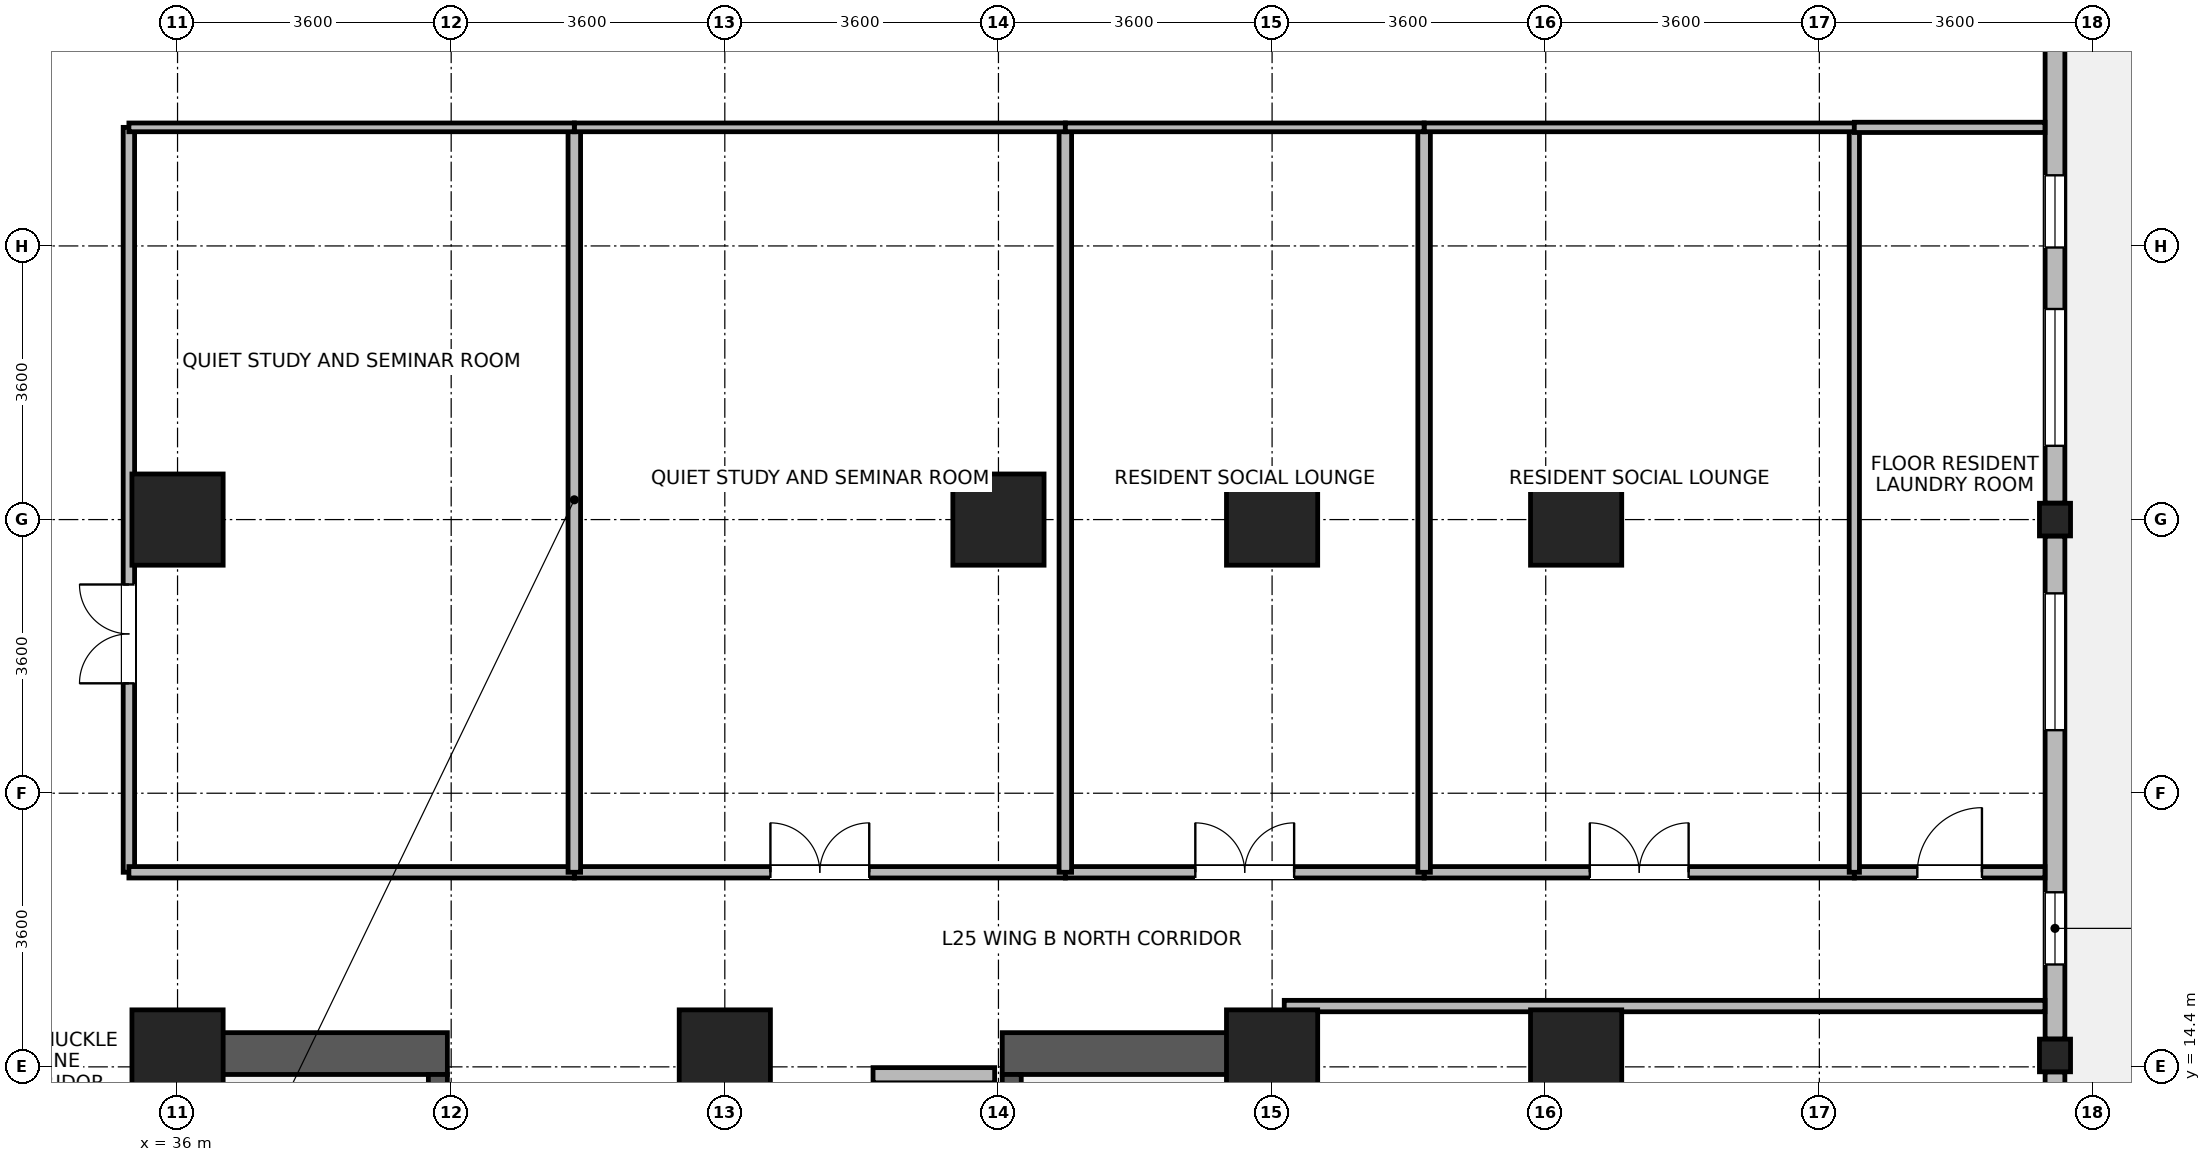
"""IFC4 building model, lengths in metres.
Left out: names, types, materials, properties, quantities, classifications, styles, units other than length and angle.
Written with IfcOpenShell. Run it as: python <this file> out.ifc"""

import sys

from ifc_helpers import new_model, si_unit, direction, frame, frame_2d, origin, origin_2d, place, context, subcontext, project, spatial, rectangle, i_section, extrude, source, transform, mapped, element, fill, save


model = new_model("IFC4")
c1 = context("Model", 3, precision=1e-05, world=origin(), true_north=direction((0.0, 1.0)))
c2 = subcontext(c1, "Body", "Model", "MODEL_VIEW")
j1 = project(units=[si_unit("LENGTHUNIT", "METRE"), si_unit("PLANEANGLEUNIT", "RADIAN")], contexts=[c1])
p1 = place(None, origin())
s1 = spatial("IfcSite", under=j1, at=p1, CompositionType="ELEMENT")
p2 = place(p1, origin())
s2 = spatial("IfcBuilding", under=s1, at=p2, CompositionType="ELEMENT")
p3 = place(p2, frame((0.0, 0.0, 100.8)))
s3 = spatial("IfcBuildingStorey", under=s2, at=p3, CompositionType="ELEMENT", Elevation=100.8)
for number, where, z_axis, x_axis in (
    (1, (36.075, 6.75, 0.0), (0.0, 0.0, 1.0), (0.0, 1.0, 0.0)),
    (2, (50.325, 6.75, 0.0), (0.0, 0.0, 1.0), (0.0, 1.0, 0.0)),
):
    element("IfcWall", number, at=place(p3, frame(where, z_axis=z_axis, x_axis=x_axis)), inside=s3, PredefinedType="SHEAR", context=c2, shape_type="SweptSolid", body=[
        extrude(rectangle(XDim=8.1, YDim=0.55, at=frame_2d((4.05, 0.0))), origin(), (0.0, 0.0, 1.0), 3.45),
    ])
for number, where, z_axis, x_axis in (
    (3, (36.35, 14.575, 0.0), (0.0, 0.0, 1.0), (1.0, 0.0, 0.0)),
    (4, (46.85, 14.575, 0.0), (0.0, 0.0, 1.0), (1.0, 0.0, 0.0)),
):
    element("IfcWall", number, at=place(p3, frame(where, z_axis=z_axis, x_axis=x_axis)), inside=s3, PredefinedType="SHEAR", context=c2, shape_type="SweptSolid", body=[
        extrude(rectangle(XDim=3.2, YDim=0.55, at=frame_2d((1.6, 0.0))), origin(), (0.0, 0.0, 1.0), 3.45),
    ])
p4 = place(p3, frame((39.425, 7.3, 0.0), z_axis=(0.0, 0.0, 1.0), x_axis=(0.0, 1.0, 0.0)))
e5 = element("IfcWall", 5, at=p4, inside=s3, PredefinedType="SHEAR", context=c2, shape_type="SweptSolid", body=[
    extrude(rectangle(XDim=7.0, YDim=0.25, at=frame_2d((3.5, 0.0))), origin(), (0.0, 0.0, 1.0), 3.45),
])
p5 = place(p4, frame((0.15, 0.0, 0.0)))
e6 = element("IfcOpeningElement", 6, at=p5, cuts=e5, PredefinedType="OPENING", context=c2, shape_type="SweptSolid", body=[
    extrude(rectangle(XDim=1.1, YDim=2.08, at=frame_2d((0.55, 1.04))), frame((0.0, 0.135, 0.0), z_axis=(0.0, -1.0, 0.0), x_axis=(1.0, 0.0, 0.0)), (0.0, 0.0, 1.0), 0.27),
])
p6 = place(p3, frame((46.975, 7.3, 0.0), z_axis=(0.0, 0.0, 1.0), x_axis=(0.0, 1.0, 0.0)))
e7 = element("IfcWall", 7, at=p6, inside=s3, PredefinedType="SHEAR", context=c2, shape_type="SweptSolid", body=[
    extrude(rectangle(XDim=7.0, YDim=0.25, at=frame_2d((3.5, 0.0))), origin(), (0.0, 0.0, 1.0), 3.45),
])
p7 = place(p6, frame((0.15, 0.0, 0.0)))
e8 = element("IfcOpeningElement", 8, at=p7, cuts=e7, PredefinedType="OPENING", context=c2, shape_type="SweptSolid", body=[
    extrude(rectangle(XDim=1.1, YDim=2.08, at=frame_2d((0.55, 1.04))), frame((0.0, 0.135, 0.0), z_axis=(0.0, -1.0, 0.0), x_axis=(1.0, 0.0, 0.0)), (0.0, 0.0, 1.0), 0.27),
])
m1 = source(origin(), c2, "Body", "SweptSolid", [
    extrude(rectangle(XDim=1.2, YDim=1.2, at=origin_2d()), origin(), (0.0, 0.0, 1.0), 3.7),
])
for number, where, z_axis, x_axis in (
    (9, (36.0, 21.6, 0.0), (0.0, 0.0, 1.0), (1.0, 0.0, 0.0)),
    (10, (46.8, 21.6, 0.0), (0.0, 0.0, 1.0), (1.0, 0.0, 0.0)),
    (11, (36.0, 14.55, 0.0), (0.0, 0.0, 1.0), (1.0, 0.0, 0.0)),
    (12, (43.2, 14.55, 0.0), (0.0, 0.0, 1.0), (1.0, 0.0, 0.0)),
    (13, (50.4, 14.55, 0.0), (0.0, 0.0, 1.0), (1.0, 0.0, 0.0)),
    (14, (50.4, 21.6, 0.0), (0.0, 0.0, 1.0), (1.0, 0.0, 0.0)),
    (15, (54.4, 14.55, 0.0), (0.0, 0.0, 1.0), (1.0, 0.0, 0.0)),
    (16, (54.4, 21.6, 0.0), (0.0, 0.0, 1.0), (1.0, 0.0, 0.0)),
):
    element("IfcColumn", number, at=place(p3, frame(where, z_axis=z_axis, x_axis=x_axis)), inside=s3, PredefinedType="COLUMN", context=c2, shape_type="MappedRepresentation", body=[
        mapped(m1, transform((0.0, 0.0, 0.0), x_axis=(1.0, 0.0, 0.0), y_axis=(0.0, 1.0, 0.0), z_axis=(0.0, 0.0, 1.0), scale=1.0)),
    ])
m2 = source(origin(), c2, "Body", "SweptSolid", [
    extrude(i_section(OverallWidth=0.409, OverallDepth=0.43, WebThickness=0.024, FlangeThickness=0.033, FilletRadius=0.015, at=origin_2d()), origin(), (0.0, 0.0, 1.0), 3.7),
])
for number, where, z_axis, x_axis in (
    (17, (60.7, 14.55, 0.0), (0.0, 0.0, 1.0), (1.0, 0.0, 0.0)),
    (18, (60.7, 21.6, 0.0), (0.0, 0.0, 1.0), (1.0, 0.0, 0.0)),
):
    element("IfcColumn", number, at=place(p3, frame(where, z_axis=z_axis, x_axis=x_axis)), inside=s3, PredefinedType="COLUMN", context=c2, shape_type="MappedRepresentation", body=[
        mapped(m2, transform((0.0, 0.0, 0.0), x_axis=(1.0, 0.0, 0.0), y_axis=(0.0, 1.0, 0.0), z_axis=(0.0, 0.0, 1.0), scale=1.0)),
    ])
p8 = place(p3, frame((60.7, 14.334, 0.0), z_axis=(0.0, 0.0, 1.0), x_axis=(0.0, -1.0, 0.0)))
e19 = element("IfcWall", 19, at=p8, inside=s3, PredefinedType="STANDARD", context=c2, shape_type="SweptSolid", body=[
    extrude(rectangle(XDim=7.068, YDim=0.26, at=frame_2d((3.534, 0.0))), origin(), (0.0, 0.0, 1.0), 2.98),
])
p9 = place(p8, frame((0.867, 0.0, 0.85)))
e20 = element("IfcOpeningElement", 20, at=p9, cuts=e19, PredefinedType="OPENING", context=c2, shape_type="SweptSolid", body=[
    extrude(rectangle(XDim=1.8, YDim=1.85, at=frame_2d((0.9, 0.925))), frame((0.0, 0.14, 0.0), z_axis=(0.0, -1.0, 0.0), x_axis=(1.0, 0.0, 0.0)), (0.0, 0.0, 1.0), 0.28),
])
p10 = place(p8, frame((4.401, 0.0, 0.85)))
e21 = element("IfcOpeningElement", 21, at=p10, cuts=e19, PredefinedType="OPENING", context=c2, shape_type="SweptSolid", body=[
    extrude(rectangle(XDim=1.8, YDim=1.85, at=frame_2d((0.9, 0.925))), frame((0.0, 0.14, 0.0), z_axis=(0.0, -1.0, 0.0), x_axis=(1.0, 0.0, 0.0)), (0.0, 0.0, 1.0), 0.28),
])
p11 = place(p3, frame((60.7, 21.384, 0.0), z_axis=(0.0, 0.0, 1.0), x_axis=(0.0, -1.0, 0.0)))
e22 = element("IfcWall", 22, at=p11, inside=s3, PredefinedType="STANDARD", context=c2, shape_type="SweptSolid", body=[
    extrude(rectangle(XDim=6.618, YDim=0.26, at=frame_2d((3.309, 0.0))), origin(), (0.0, 0.0, 1.0), 2.98),
])
p12 = place(p11, frame((0.754, 0.0, 0.85)))
e23 = element("IfcOpeningElement", 23, at=p12, cuts=e22, PredefinedType="OPENING", context=c2, shape_type="SweptSolid", body=[
    extrude(rectangle(XDim=1.8, YDim=1.85, at=frame_2d((0.9, 0.925))), frame((0.0, 0.14, 0.0), z_axis=(0.0, -1.0, 0.0), x_axis=(1.0, 0.0, 0.0)), (0.0, 0.0, 1.0), 0.28),
])
p13 = place(p11, frame((4.687, 0.0, 0.85)))
e24 = element("IfcOpeningElement", 24, at=p13, cuts=e22, PredefinedType="OPENING", context=c2, shape_type="SweptSolid", body=[
    extrude(rectangle(XDim=0.95, YDim=1.75, at=frame_2d((0.475, 0.875))), frame((0.0, 0.14, 0.0), z_axis=(0.0, -1.0, 0.0), x_axis=(1.0, 0.0, 0.0)), (0.0, 0.0, 1.0), 0.28),
])
p14 = place(p3, frame((60.7, 28.434, 0.0), z_axis=(0.0, 0.0, 1.0), x_axis=(0.0, -1.0, 0.0)))
e25 = element("IfcWall", 25, at=p14, inside=s3, PredefinedType="STANDARD", context=c2, shape_type="SweptSolid", body=[
    extrude(rectangle(XDim=6.618, YDim=0.26, at=frame_2d((3.309, 0.0))), origin(), (0.0, 0.0, 1.0), 2.98),
])
p15 = place(p14, frame((4.063, 0.0, 0.85)))
e26 = element("IfcOpeningElement", 26, at=p15, cuts=e25, PredefinedType="OPENING", context=c2, shape_type="SweptSolid", body=[
    extrude(rectangle(XDim=1.8, YDim=1.85, at=frame_2d((0.9, 0.925))), frame((0.0, 0.14, 0.0), z_axis=(0.0, -1.0, 0.0), x_axis=(1.0, 0.0, 0.0)), (0.0, 0.0, 1.0), 0.28),
])
p16 = place(p14, frame((2.305, 0.0, 0.85)))
e27 = element("IfcOpeningElement", 27, at=p16, cuts=e25, PredefinedType="OPENING", context=c2, shape_type="SweptSolid", body=[
    extrude(rectangle(XDim=0.95, YDim=1.75, at=frame_2d((0.475, 0.875))), frame((0.0, 0.14, 0.0), z_axis=(0.0, -1.0, 0.0), x_axis=(1.0, 0.0, 0.0)), (0.0, 0.0, 1.0), 0.28),
])
p17 = place(p3, frame((45.15, 14.29, 0.0), z_axis=(0.0, 0.0, 1.0), x_axis=(1.0, 0.0, 0.0)))
e28 = element("IfcWall", 28, at=p17, inside=s3, PredefinedType="PARTITIONING", context=c2, shape_type="SweptSolid", body=[
    extrude(rectangle(XDim=1.6, YDim=0.2, at=frame_2d((0.8, 0.0))), origin(), (0.0, 0.0, 1.0), 2.43),
])
p18 = place(p3, frame((50.56, 15.2, 0.0), z_axis=(0.0, 0.0, 1.0), x_axis=(1.0, 0.0, 0.0)))
e29 = element("IfcWall", 29, at=p18, inside=s3, PredefinedType="PARTITIONING", context=c2, shape_type="SweptSolid", body=[
    extrude(rectangle(XDim=10.008, YDim=0.15, at=frame_2d((5.004, 0.0))), origin(), (0.0, 0.0, 1.0), 3.43),
])
p19 = place(p3, frame((35.36, 16.96, 0.0), z_axis=(0.0, 0.0, 1.0), x_axis=(0.0, 1.0, 0.0)))
e30 = element("IfcWall", 30, at=p19, inside=s3, PredefinedType="PARTITIONING", context=c2, shape_type="SweptSolid", body=[
    extrude(rectangle(XDim=9.8, YDim=0.15, at=frame_2d((4.9, 0.0))), origin(), (0.0, 0.0, 1.0), 3.43),
])
p20 = place(p19, frame((2.486, 0.0, 0.0)))
e31 = element("IfcOpeningElement", 31, at=p20, cuts=e30, PredefinedType="OPENING", context=c2, shape_type="SweptSolid", body=[
    extrude(rectangle(XDim=1.3, YDim=2.12, at=frame_2d((0.65, 1.06))), frame((0.0, 0.085, 0.0), z_axis=(0.0, -1.0, 0.0), x_axis=(1.0, 0.0, 0.0)), (0.0, 0.0, 1.0), 0.17),
])
p21 = place(p3, frame((41.22, 16.96, 0.0), z_axis=(0.0, 0.0, 1.0), x_axis=(1.0, 0.0, 0.0)))
e32 = element("IfcWall", 32, at=p21, inside=s3, PredefinedType="PARTITIONING", context=c2, shape_type="SweptSolid", body=[
    extrude(rectangle(XDim=6.46, YDim=0.15, at=frame_2d((3.23, 0.0))), origin(), (0.0, 0.0, 1.0), 3.43),
])
p22 = place(p21, frame((2.58, 0.0, 0.0)))
e33 = element("IfcOpeningElement", 33, at=p22, cuts=e32, PredefinedType="OPENING", context=c2, shape_type="SweptSolid", body=[
    extrude(rectangle(XDim=1.3, YDim=2.12, at=frame_2d((0.65, 1.06))), frame((0.0, 0.085, 0.0), z_axis=(0.0, -1.0, 0.0), x_axis=(1.0, 0.0, 0.0)), (0.0, 0.0, 1.0), 0.17),
])
p23 = place(p3, frame((35.36, 16.96, 0.0), z_axis=(0.0, 0.0, 1.0), x_axis=(1.0, 0.0, 0.0)))
e34 = element("IfcWall", 34, at=p23, inside=s3, PredefinedType="PARTITIONING", context=c2, shape_type="SweptSolid", body=[
    extrude(rectangle(XDim=5.86, YDim=0.15, at=frame_2d((2.93, 0.0))), origin(), (0.0, 0.0, 1.0), 3.43),
])
p24 = place(p3, frame((52.4, 16.96, 0.0), z_axis=(0.0, 0.0, 1.0), x_axis=(1.0, 0.0, 0.0)))
e35 = element("IfcWall", 35, at=p24, inside=s3, PredefinedType="PARTITIONING", context=c2, shape_type="SweptSolid", body=[
    extrude(rectangle(XDim=5.66, YDim=0.15, at=frame_2d((2.83, 0.0))), origin(), (0.0, 0.0, 1.0), 3.43),
])
p25 = place(p24, frame((2.18, 0.0, 0.0)))
e36 = element("IfcOpeningElement", 36, at=p25, cuts=e35, PredefinedType="OPENING", context=c2, shape_type="SweptSolid", body=[
    extrude(rectangle(XDim=1.3, YDim=2.12, at=frame_2d((0.65, 1.06))), frame((0.0, 0.085, 0.0), z_axis=(0.0, -1.0, 0.0), x_axis=(1.0, 0.0, 0.0)), (0.0, 0.0, 1.0), 0.17),
])
p26 = place(p3, frame((47.68, 16.96, 0.0), z_axis=(0.0, 0.0, 1.0), x_axis=(1.0, 0.0, 0.0)))
e37 = element("IfcWall", 37, at=p26, inside=s3, PredefinedType="PARTITIONING", context=c2, shape_type="SweptSolid", body=[
    extrude(rectangle(XDim=4.72, YDim=0.15, at=frame_2d((2.36, 0.0))), origin(), (0.0, 0.0, 1.0), 3.43),
])
p27 = place(p26, frame((1.71, 0.0, 0.0)))
e38 = element("IfcOpeningElement", 38, at=p27, cuts=e37, PredefinedType="OPENING", context=c2, shape_type="SweptSolid", body=[
    extrude(rectangle(XDim=1.3, YDim=2.12, at=frame_2d((0.65, 1.06))), frame((0.0, 0.085, 0.0), z_axis=(0.0, -1.0, 0.0), x_axis=(1.0, 0.0, 0.0)), (0.0, 0.0, 1.0), 0.17),
])
p28 = place(p3, frame((58.06, 16.96, 0.0), z_axis=(0.0, 0.0, 1.0), x_axis=(1.0, 0.0, 0.0)))
e39 = element("IfcWall", 39, at=p28, inside=s3, PredefinedType="PARTITIONING", context=c2, shape_type="SweptSolid", body=[
    extrude(rectangle(XDim=2.508, YDim=0.15, at=frame_2d((1.254, 0.0))), origin(), (0.0, 0.0, 1.0), 3.43),
])
p29 = place(p28, frame((0.829, 0.0, 0.0)))
e40 = element("IfcOpeningElement", 40, at=p29, cuts=e39, PredefinedType="OPENING", context=c2, shape_type="SweptSolid", body=[
    extrude(rectangle(XDim=0.85, YDim=2.04, at=frame_2d((0.425, 1.02))), frame((0.0, 0.085, 0.0), z_axis=(0.0, -1.0, 0.0), x_axis=(1.0, 0.0, 0.0)), (0.0, 0.0, 1.0), 0.17),
])
for number, where, z_axis, x_axis in (
    (41, (41.22, 16.96, 0.0), (0.0, 0.0, 1.0), (0.0, 1.0, 0.0)),
    (42, (47.68, 16.96, 0.0), (0.0, 0.0, 1.0), (0.0, 1.0, 0.0)),
    (43, (52.4, 16.96, 0.0), (0.0, 0.0, 1.0), (0.0, 1.0, 0.0)),
):
    element("IfcWall", number, at=place(p3, frame(where, z_axis=z_axis, x_axis=x_axis)), inside=s3, PredefinedType="PARTITIONING", context=c2, shape_type="SweptSolid", body=[
        extrude(rectangle(XDim=9.8, YDim=0.165, at=frame_2d((4.9, 0.0))), origin(), (0.0, 0.0, 1.0), 3.43),
    ])
p30 = place(p3, frame((58.06, 16.96, 0.0), z_axis=(0.0, 0.0, 1.0), x_axis=(0.0, 1.0, 0.0)))
e44 = element("IfcWall", 44, at=p30, inside=s3, PredefinedType="PARTITIONING", context=c2, shape_type="SweptSolid", body=[
    extrude(rectangle(XDim=9.8, YDim=0.135, at=frame_2d((4.9, 0.0))), origin(), (0.0, 0.0, 1.0), 3.43),
])
p31 = place(p3, frame((41.22, 26.76, 0.0), z_axis=(0.0, 0.0, 1.0), x_axis=(1.0, 0.0, 0.0)))
e45 = element("IfcWall", 45, at=p31, inside=s3, PredefinedType="PARTITIONING", context=c2, shape_type="SweptSolid", body=[
    extrude(rectangle(XDim=6.46, YDim=0.115, at=frame_2d((3.23, 0.0))), origin(), (0.0, 0.0, 1.0), 3.43),
])
p32 = place(p3, frame((35.36, 26.76, 0.0), z_axis=(0.0, 0.0, 1.0), x_axis=(1.0, 0.0, 0.0)))
e46 = element("IfcWall", 46, at=p32, inside=s3, PredefinedType="PARTITIONING", context=c2, shape_type="SweptSolid", body=[
    extrude(rectangle(XDim=5.86, YDim=0.115, at=frame_2d((2.93, 0.0))), origin(), (0.0, 0.0, 1.0), 3.43),
])
p33 = place(p3, frame((52.4, 26.76, 0.0), z_axis=(0.0, 0.0, 1.0), x_axis=(1.0, 0.0, 0.0)))
e47 = element("IfcWall", 47, at=p33, inside=s3, PredefinedType="PARTITIONING", context=c2, shape_type="SweptSolid", body=[
    extrude(rectangle(XDim=5.66, YDim=0.115, at=frame_2d((2.83, 0.0))), origin(), (0.0, 0.0, 1.0), 3.43),
])
p34 = place(p3, frame((47.68, 26.76, 0.0), z_axis=(0.0, 0.0, 1.0), x_axis=(1.0, 0.0, 0.0)))
e48 = element("IfcWall", 48, at=p34, inside=s3, PredefinedType="PARTITIONING", context=c2, shape_type="SweptSolid", body=[
    extrude(rectangle(XDim=4.72, YDim=0.115, at=frame_2d((2.36, 0.0))), origin(), (0.0, 0.0, 1.0), 3.43),
])
p35 = place(p3, frame((58.06, 26.76, 0.0), z_axis=(0.0, 0.0, 1.0), x_axis=(1.0, 0.0, 0.0)))
e49 = element("IfcWall", 49, at=p35, inside=s3, PredefinedType="PARTITIONING", context=c2, shape_type="SweptSolid", body=[
    extrude(rectangle(XDim=2.508, YDim=0.135, at=frame_2d((1.254, 0.0))), origin(), (0.0, 0.0, 1.0), 3.43),
])
p36 = place(p12, origin())
e50 = element("IfcWindow", 50, at=p36, inside=s3, PartitioningType="SINGLE_PANEL", PredefinedType="WINDOW", context=c2, shape_type="SweptSolid", body=[
    extrude(rectangle(XDim=1.8, YDim=1.85, at=frame_2d((0.9, 0.925))), frame((0.0, 0.03, 0.0), z_axis=(0.0, -1.0, 0.0), x_axis=(1.0, 0.0, 0.0)), (0.0, 0.0, 1.0), 0.06),
])
fill(e23, e50)
p37 = place(p13, origin())
e51 = element("IfcWindow", 51, at=p37, inside=s3, PartitioningType="SINGLE_PANEL", PredefinedType="WINDOW", context=c2, shape_type="SweptSolid", body=[
    extrude(rectangle(XDim=0.95, YDim=1.75, at=frame_2d((0.475, 0.875))), frame((0.0, 0.03, 0.0), z_axis=(0.0, -1.0, 0.0), x_axis=(1.0, 0.0, 0.0)), (0.0, 0.0, 1.0), 0.06),
])
fill(e24, e51)
p38 = place(p15, origin())
e52 = element("IfcWindow", 52, at=p38, inside=s3, PartitioningType="SINGLE_PANEL", PredefinedType="WINDOW", context=c2, shape_type="SweptSolid", body=[
    extrude(rectangle(XDim=1.8, YDim=1.85, at=frame_2d((0.9, 0.925))), frame((0.0, 0.03, 0.0), z_axis=(0.0, -1.0, 0.0), x_axis=(1.0, 0.0, 0.0)), (0.0, 0.0, 1.0), 0.06),
])
fill(e26, e52)
p39 = place(p16, origin())
e53 = element("IfcWindow", 53, at=p39, inside=s3, PartitioningType="SINGLE_PANEL", PredefinedType="WINDOW", context=c2, shape_type="SweptSolid", body=[
    extrude(rectangle(XDim=0.95, YDim=1.75, at=frame_2d((0.475, 0.875))), frame((0.0, 0.03, 0.0), z_axis=(0.0, -1.0, 0.0), x_axis=(1.0, 0.0, 0.0)), (0.0, 0.0, 1.0), 0.06),
])
fill(e27, e53)
p40 = place(p20, origin())
e54 = element("IfcDoor", 54, at=p40, inside=s3, OperationType="DOUBLE_DOOR_SINGLE_SWING", PredefinedType="DOOR", context=c2, shape_type="SweptSolid", body=[
    extrude(rectangle(XDim=1.3, YDim=2.12, at=frame_2d((0.65, 1.06))), frame((0.0, 0.025, 0.0), z_axis=(0.0, -1.0, 0.0), x_axis=(1.0, 0.0, 0.0)), (0.0, 0.0, 1.0), 0.05),
])
fill(e31, e54)
p41 = place(p22, origin())
e55 = element("IfcDoor", 55, at=p41, inside=s3, OperationType="DOUBLE_DOOR_SINGLE_SWING", PredefinedType="DOOR", context=c2, shape_type="SweptSolid", body=[
    extrude(rectangle(XDim=1.3, YDim=2.12, at=frame_2d((0.65, 1.06))), frame((0.0, 0.025, 0.0), z_axis=(0.0, -1.0, 0.0), x_axis=(1.0, 0.0, 0.0)), (0.0, 0.0, 1.0), 0.05),
])
fill(e33, e55)
p42 = place(p25, origin())
e56 = element("IfcDoor", 56, at=p42, inside=s3, OperationType="DOUBLE_DOOR_SINGLE_SWING", PredefinedType="DOOR", context=c2, shape_type="SweptSolid", body=[
    extrude(rectangle(XDim=1.3, YDim=2.12, at=frame_2d((0.65, 1.06))), frame((0.0, 0.025, 0.0), z_axis=(0.0, -1.0, 0.0), x_axis=(1.0, 0.0, 0.0)), (0.0, 0.0, 1.0), 0.05),
])
fill(e36, e56)
p43 = place(p27, origin())
e57 = element("IfcDoor", 57, at=p43, inside=s3, OperationType="DOUBLE_DOOR_SINGLE_SWING", PredefinedType="DOOR", context=c2, shape_type="SweptSolid", body=[
    extrude(rectangle(XDim=1.3, YDim=2.12, at=frame_2d((0.65, 1.06))), frame((0.0, 0.025, 0.0), z_axis=(0.0, -1.0, 0.0), x_axis=(1.0, 0.0, 0.0)), (0.0, 0.0, 1.0), 0.05),
])
fill(e38, e57)
p44 = place(p29, origin())
e58 = element("IfcDoor", 58, at=p44, inside=s3, OperationType="SINGLE_SWING_RIGHT", PredefinedType="DOOR", context=c2, shape_type="SweptSolid", body=[
    extrude(rectangle(XDim=0.85, YDim=2.04, at=frame_2d((0.425, 1.02))), frame((0.0, 0.025, 0.0), z_axis=(0.0, -1.0, 0.0), x_axis=(1.0, 0.0, 0.0)), (0.0, 0.0, 1.0), 0.05),
])
fill(e40, e58)
save(model, sys.argv[1])
